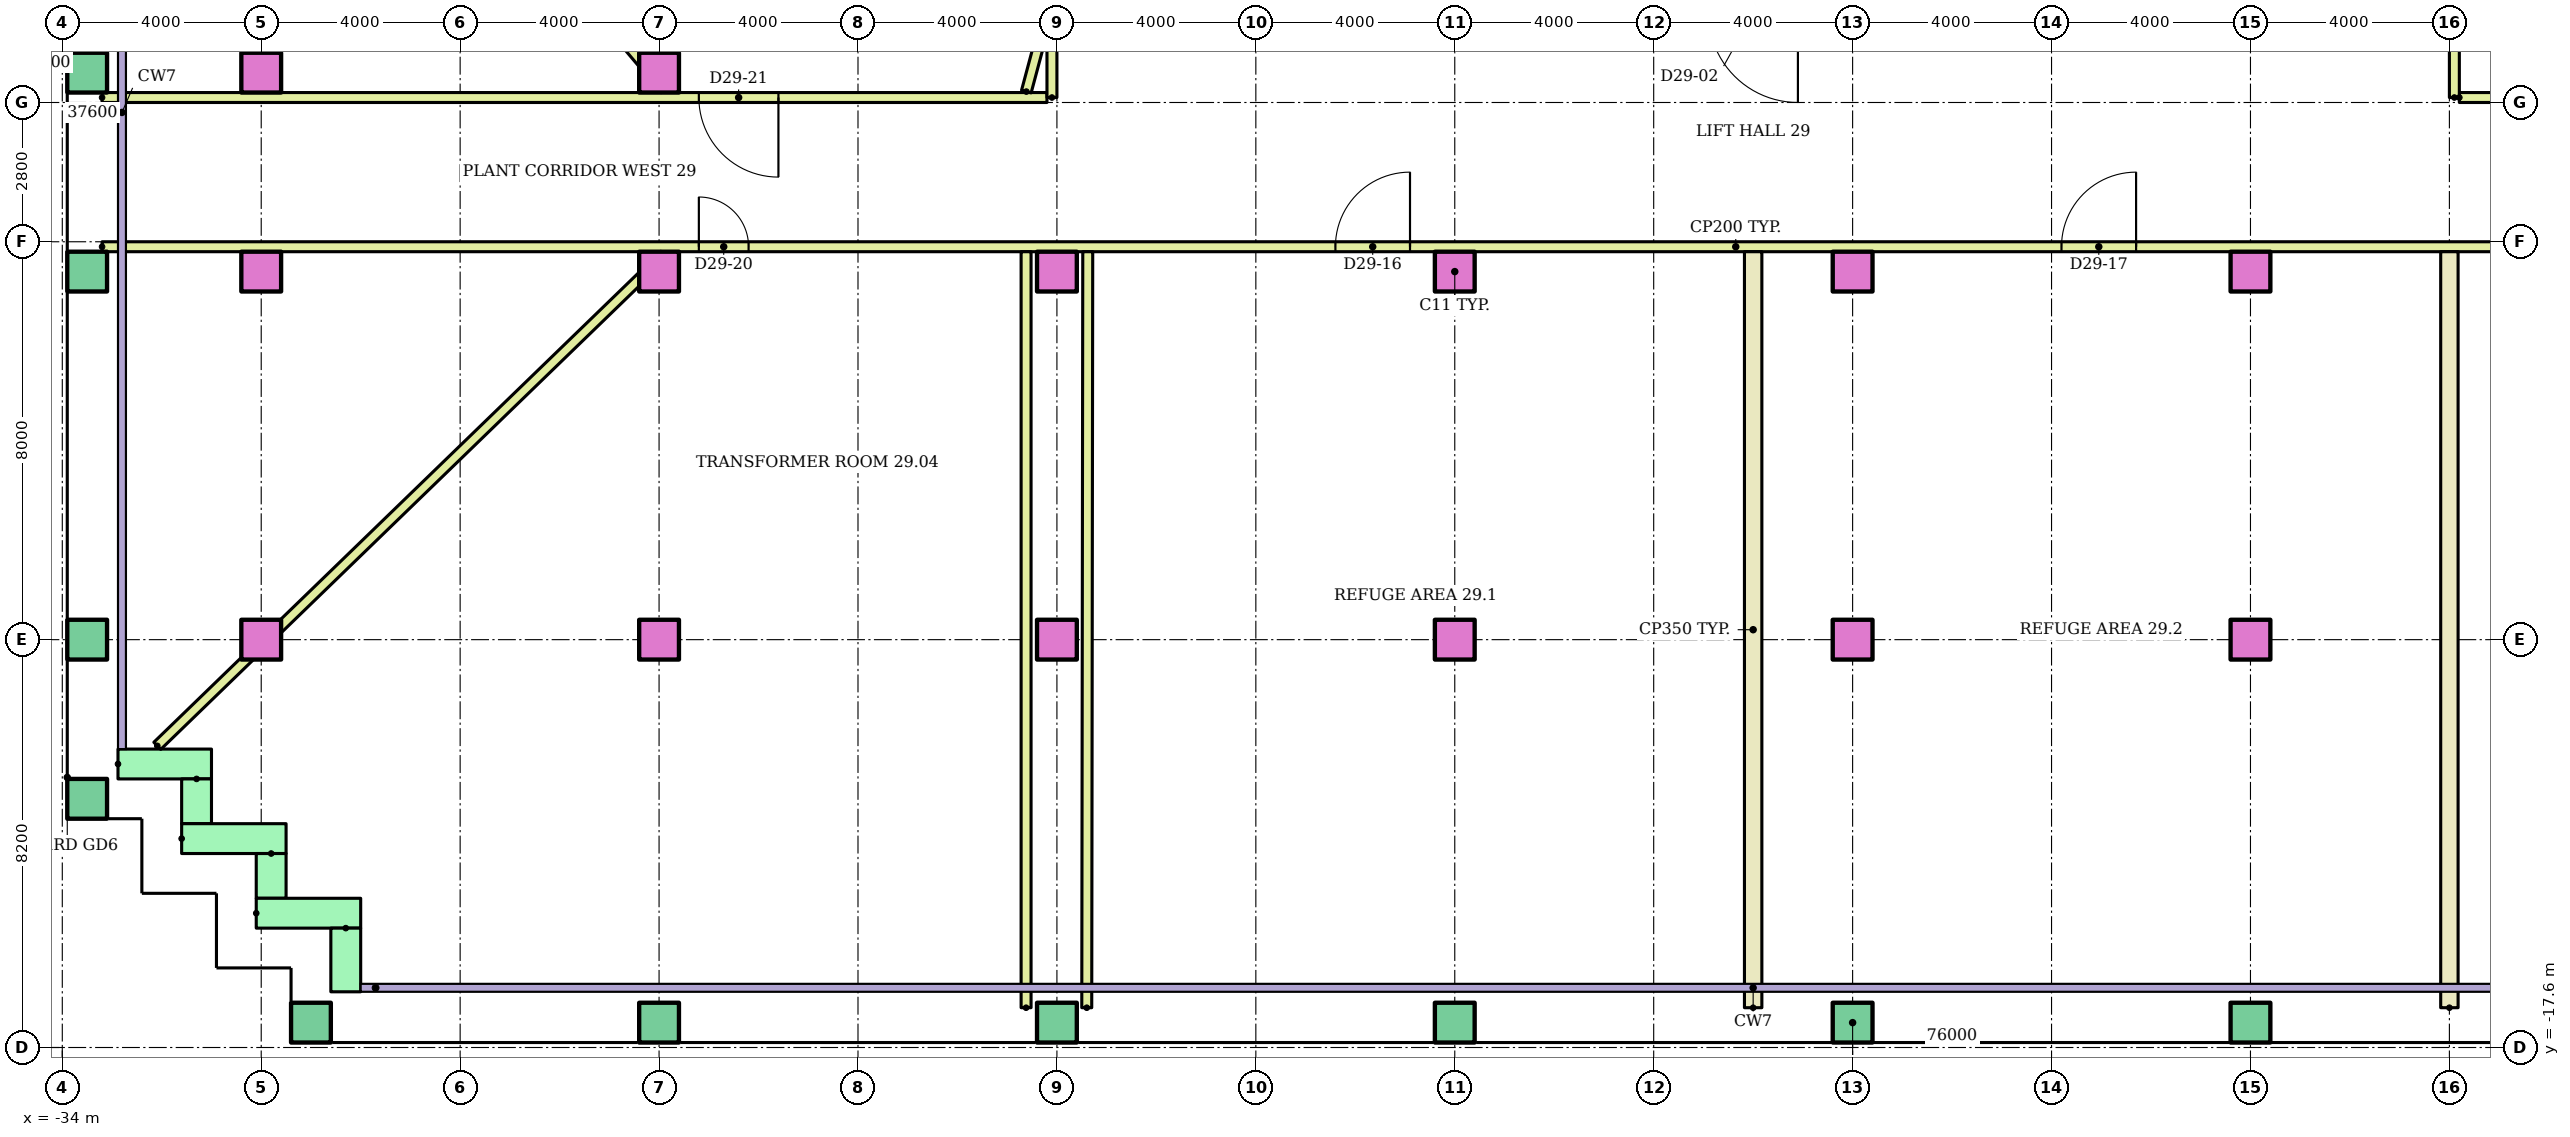
"""IFC4 building model, lengths in metres.
Left out: names, types, materials, properties, quantities, classifications, styles, units other than length and angle.
Written with IfcOpenShell. Run it as: python <this file> out.ifc"""

import sys

from ifc_helpers import new_model, si_unit, direction, frame, frame_2d, origin, origin_2d, place, context, subcontext, project, spatial, rectangle, hollow_rectangle, extrude, element, fill, save


model = new_model("IFC4")
c1 = context("Model", 3, precision=1e-05, world=origin(), true_north=direction((0.0, 1.0)))
c2 = subcontext(c1, "Body", "Model", "MODEL_VIEW")
j1 = project(units=[si_unit("LENGTHUNIT", "METRE"), si_unit("PLANEANGLEUNIT", "RADIAN")], contexts=[c1])
p1 = place(None, origin())
s1 = spatial("IfcSite", under=j1, at=p1, CompositionType="ELEMENT")
p2 = place(p1, origin())
s2 = spatial("IfcBuilding", under=s1, at=p2, CompositionType="ELEMENT")
p3 = place(p2, frame((0.0, 0.0, 115.9)))
s3 = spatial("IfcBuildingStorey", under=s2, at=p3, CompositionType="ELEMENT", Elevation=115.9)
for number, where in (
    (1, (-29.0, -17.1, 0.0)),
    (2, (-22.0, -17.1, 0.0)),
    (3, (-14.0, -17.1, 0.0)),
    (4, (-6.0, -17.1, 0.0)),
    (5, (2.0, -17.1, 0.0)),
    (6, (10.0, -17.1, 0.0)),
    (7, (-33.5, -12.6, 0.0)),
    (8, (-33.5, -9.4, 0.0)),
):
    element("IfcColumn", number, at=place(p3, frame(where)), inside=s3, PredefinedType="COLUMN", context=c2, shape_type="SweptSolid", body=[
        extrude(hollow_rectangle(XDim=0.8, YDim=0.8, WallThickness=0.04, at=origin_2d()), origin(), (0.0, 0.0, 1.0), 3.9),
    ])
for number, where in (
    (9, (-30.0, -9.4, 0.0)),
    (10, (-22.0, -9.4, 0.0)),
    (11, (-14.0, -9.4, 0.0)),
    (12, (-6.0, -9.4, 0.0)),
    (13, (2.0, -9.4, 0.0)),
    (14, (10.0, -9.4, 0.0)),
):
    element("IfcColumn", number, at=place(p3, frame(where)), inside=s3, PredefinedType="COLUMN", context=c2, shape_type="SweptSolid", body=[
        extrude(rectangle(XDim=0.8, YDim=0.8, at=origin_2d()), origin(), (0.0, 0.0, 1.0), 3.9),
    ])
p4 = place(p3, frame((-33.5, -2.0, 0.0)))
e15 = element("IfcColumn", 15, at=p4, inside=s3, PredefinedType="COLUMN", context=c2, shape_type="SweptSolid", body=[
    extrude(hollow_rectangle(XDim=0.8, YDim=0.8, WallThickness=0.04, at=origin_2d()), origin(), (0.0, 0.0, 1.0), 3.9),
])
for number, where in (
    (16, (-30.0, -2.0, 0.0)),
    (17, (-22.0, -2.0, 0.0)),
    (18, (-14.0, -2.0, 0.0)),
    (19, (-6.0, -2.0, 0.0)),
    (20, (2.0, -2.0, 0.0)),
    (21, (10.0, -2.0, 0.0)),
):
    element("IfcColumn", number, at=place(p3, frame(where)), inside=s3, PredefinedType="COLUMN", context=c2, shape_type="SweptSolid", body=[
        extrude(rectangle(XDim=0.8, YDim=0.8, at=origin_2d()), origin(), (0.0, 0.0, 1.0), 3.9),
    ])
p5 = place(p3, frame((-33.5, 2.0, 0.0)))
e22 = element("IfcColumn", 22, at=p5, inside=s3, PredefinedType="COLUMN", context=c2, shape_type="SweptSolid", body=[
    extrude(hollow_rectangle(XDim=0.8, YDim=0.8, WallThickness=0.04, at=origin_2d()), origin(), (0.0, 0.0, 1.0), 3.9),
])
for number, where in (
    (23, (-30.0, 2.0, 0.0)),
    (24, (-22.0, 2.0, 0.0)),
):
    element("IfcColumn", number, at=place(p3, frame(where)), inside=s3, PredefinedType="COLUMN", context=c2, shape_type="SweptSolid", body=[
        extrude(rectangle(XDim=0.8, YDim=0.8, at=origin_2d()), origin(), (0.0, 0.0, 1.0), 3.9),
    ])
p6 = place(p3, frame((-32.88, -11.9, 0.0)))
e25 = element("IfcWall", 25, at=p6, inside=s3, PredefinedType="STANDARD", context=c2, shape_type="SweptSolid", body=[
    extrude(rectangle(XDim=1.88, YDim=0.6, at=frame_2d((0.94, 0.0))), origin(), (0.0, 0.0, 1.0), 3.62),
])
p7 = place(p3, frame((-31.3, -12.2, 0.0), z_axis=(0.0, 0.0, 1.0), x_axis=(0.0, -1.0, 0.0)))
e26 = element("IfcWall", 26, at=p7, inside=s3, PredefinedType="STANDARD", context=c2, shape_type="SweptSolid", body=[
    extrude(rectangle(XDim=0.9, YDim=0.6, at=frame_2d((0.45, 0.0))), origin(), (0.0, 0.0, 1.0), 3.62),
])
p8 = place(p3, frame((-31.6, -13.4, 0.0)))
e27 = element("IfcWall", 27, at=p8, inside=s3, PredefinedType="STANDARD", context=c2, shape_type="SweptSolid", body=[
    extrude(rectangle(XDim=2.1, YDim=0.6, at=frame_2d((1.05, 0.0))), origin(), (0.0, 0.0, 1.0), 3.62),
])
p9 = place(p3, frame((-29.8, -13.7, 0.0), z_axis=(0.0, 0.0, 1.0), x_axis=(0.0, -1.0, 0.0)))
e28 = element("IfcWall", 28, at=p9, inside=s3, PredefinedType="STANDARD", context=c2, shape_type="SweptSolid", body=[
    extrude(rectangle(XDim=0.9, YDim=0.6, at=frame_2d((0.45, 0.0))), origin(), (0.0, 0.0, 1.0), 3.62),
])
p10 = place(p3, frame((-30.1, -14.9, 0.0)))
e29 = element("IfcWall", 29, at=p10, inside=s3, PredefinedType="STANDARD", context=c2, shape_type="SweptSolid", body=[
    extrude(rectangle(XDim=2.1, YDim=0.6, at=frame_2d((1.05, 0.0))), origin(), (0.0, 0.0, 1.0), 3.62),
])
p11 = place(p3, frame((-28.3, -15.2, 0.0), z_axis=(0.0, 0.0, 1.0), x_axis=(0.0, -1.0, 0.0)))
e30 = element("IfcWall", 30, at=p11, inside=s3, PredefinedType="STANDARD", context=c2, shape_type="SweptSolid", body=[
    extrude(rectangle(XDim=1.28, YDim=0.6, at=frame_2d((0.64, 0.0))), origin(), (0.0, 0.0, 1.0), 3.62),
])
p12 = place(p3, frame((-33.2, -1.5, 0.0)))
e31 = element("IfcWall", 31, at=p12, inside=s3, PredefinedType="PARTITIONING", context=c2, shape_type="SweptSolid", body=[
    extrude(rectangle(XDim=65.7, YDim=0.2, at=frame_2d((32.85, 0.0))), origin(), (0.0, 0.0, 1.0), 3.62),
])
p13 = place(p12, frame((24.8, 0.0, 0.0)))
e32 = element("IfcOpeningElement", 32, at=p13, cuts=e31, PredefinedType="OPENING", context=c2, shape_type="SweptSolid", body=[
    extrude(rectangle(XDim=1.5, YDim=2.1, at=frame_2d((0.75, 1.05))), frame((0.0, 0.11, 0.0), z_axis=(0.0, -1.0, 0.0), x_axis=(1.0, 0.0, 0.0)), (0.0, 0.0, 1.0), 0.22),
])
p14 = place(p12, frame((39.4, 0.0, 0.0)))
e33 = element("IfcOpeningElement", 33, at=p14, cuts=e31, PredefinedType="OPENING", context=c2, shape_type="SweptSolid", body=[
    extrude(rectangle(XDim=1.5, YDim=2.1, at=frame_2d((0.75, 1.05))), frame((0.0, 0.11, 0.0), z_axis=(0.0, -1.0, 0.0), x_axis=(1.0, 0.0, 0.0)), (0.0, 0.0, 1.0), 0.22),
])
p15 = place(p12, frame((55.2, 0.0, 0.0)))
e34 = element("IfcOpeningElement", 34, at=p15, cuts=e31, PredefinedType="OPENING", context=c2, shape_type="SweptSolid", body=[
    extrude(rectangle(XDim=1.6, YDim=2.4, at=frame_2d((0.8, 1.2))), frame((0.0, 0.11, 0.0), z_axis=(0.0, -1.0, 0.0), x_axis=(1.0, 0.0, 0.0)), (0.0, 0.0, 1.0), 0.22),
])
p16 = place(p12, frame((12.0, 0.0, 0.0)))
e35 = element("IfcOpeningElement", 35, at=p16, cuts=e31, PredefinedType="OPENING", context=c2, shape_type="SweptSolid", body=[
    extrude(rectangle(XDim=1.0, YDim=2.4, at=frame_2d((0.5, 1.2))), frame((0.0, 0.11, 0.0), z_axis=(0.0, -1.0, 0.0), x_axis=(1.0, 0.0, 0.0)), (0.0, 0.0, 1.0), 0.22),
])
p17 = place(p3, frame((-33.2, 1.5, 0.0)))
e36 = element("IfcWall", 36, at=p17, inside=s3, PredefinedType="PARTITIONING", context=c2, shape_type="SweptSolid", body=[
    extrude(rectangle(XDim=19.0, YDim=0.2, at=frame_2d((9.5, 0.0))), origin(), (0.0, 0.0, 1.0), 3.62),
])
p18 = place(p17, frame((12.0, 0.0, 0.0)))
e37 = element("IfcOpeningElement", 37, at=p18, cuts=e36, PredefinedType="OPENING", context=c2, shape_type="SweptSolid", body=[
    extrude(rectangle(XDim=1.6, YDim=2.4, at=frame_2d((0.8, 1.2))), frame((0.0, 0.11, 0.0), z_axis=(0.0, -1.0, 0.0), x_axis=(1.0, 0.0, 0.0)), (0.0, 0.0, 1.0), 0.22),
])
p19 = place(p3, frame((14.2, 1.5, 0.0)))
e38 = element("IfcWall", 38, at=p19, inside=s3, PredefinedType="PARTITIONING", context=c2, shape_type="SweptSolid", body=[
    extrude(rectangle(XDim=18.3, YDim=0.2, at=frame_2d((9.15, 0.0))), origin(), (0.0, 0.0, 1.0), 3.62),
])
p20 = place(p19, frame((8.0, 0.0, 0.0)))
e39 = element("IfcOpeningElement", 39, at=p20, cuts=e38, PredefinedType="OPENING", context=c2, shape_type="SweptSolid", body=[
    extrude(rectangle(XDim=1.6, YDim=2.4, at=frame_2d((0.8, 1.2))), frame((0.0, 0.11, 0.0), z_axis=(0.0, -1.0, 0.0), x_axis=(1.0, 0.0, 0.0)), (0.0, 0.0, 1.0), 0.22),
])
p21 = place(p3, frame((-14.1, 1.5, 0.0), z_axis=(0.0, 0.0, 1.0), x_axis=(0.0, 1.0, 0.0)))
e40 = element("IfcWall", 40, at=p21, inside=s3, PredefinedType="PARTITIONING", context=c2, shape_type="SweptSolid", body=[
    extrude(rectangle(XDim=1.31, YDim=0.2, at=frame_2d((0.655, 0.0))), origin(), (0.0, 0.0, 1.0), 3.62),
])
p22 = place(p3, frame((14.1, 1.5, 0.0), z_axis=(0.0, 0.0, 1.0), x_axis=(0.0, 1.0, 0.0)))
e41 = element("IfcWall", 41, at=p22, inside=s3, PredefinedType="PARTITIONING", context=c2, shape_type="SweptSolid", body=[
    extrude(rectangle(XDim=1.5, YDim=0.2, at=frame_2d((0.75, 0.0))), origin(), (0.0, 0.0, 1.0), 3.62),
])
p23 = place(p3, frame((-13.4, -16.8, 0.0), z_axis=(0.0, 0.0, 1.0), x_axis=(0.001317077513, 0.999999132653, 0.0)))
e42 = element("IfcWall", 42, at=p23, inside=s3, PredefinedType="PARTITIONING", context=c2, shape_type="SweptSolid", body=[
    extrude(rectangle(XDim=15.2, YDim=0.2, at=frame_2d((7.6, 0.0))), origin(), (0.0, 0.0, 1.0), 3.62),
])
p24 = place(p3, frame((-32.09, -11.535, 0.0), z_axis=(0.0, 0.0, 1.0), x_axis=(0.718386628717, 0.695644055304, 0.0)))
e43 = element("IfcWall", 43, at=p24, inside=s3, PredefinedType="PARTITIONING", context=c2, shape_type="SweptSolid", body=[
    extrude(rectangle(XDim=14.192, YDim=0.2, at=frame_2d((7.096, 0.0))), origin(), (0.0, 0.0, 1.0), 3.62),
])
p25 = place(p3, frame((-14.62, -16.8, 0.0), z_axis=(0.0, 0.0, 1.0), x_axis=(0.0, 1.0, 0.0)))
e44 = element("IfcWall", 44, at=p25, inside=s3, PredefinedType="PARTITIONING", context=c2, shape_type="SweptSolid", body=[
    extrude(rectangle(XDim=15.2, YDim=0.2, at=frame_2d((7.6, 0.0))), origin(), (0.0, 0.0, 1.0), 3.62),
])
for number, where, z_axis, x_axis in (
    (45, (0.0, -16.8, 0.0), (0.0, 0.0, 1.0), (0.0, 1.0, 0.0)),
    (46, (14.0, -16.8, 0.0), (0.0, 0.0, 1.0), (0.0, 1.0, 0.0)),
):
    element("IfcWall", number, at=place(p3, frame(where, z_axis=z_axis, x_axis=x_axis)), inside=s3, PredefinedType="PARTITIONING", context=c2, shape_type="SweptSolid", body=[
        extrude(rectangle(XDim=15.2, YDim=0.35, at=frame_2d((7.6, 0.0))), origin(), (0.0, 0.0, 1.0), 3.62),
    ])
p26 = place(p3, frame((-14.615, 1.619, 0.0), z_axis=(0.0, 0.0, 1.0), x_axis=(0.258429414785, 0.966030143201, 0.0)))
e47 = element("IfcWall", 47, at=p26, inside=s3, PredefinedType="PARTITIONING", context=c2, shape_type="SweptSolid", body=[
    extrude(rectangle(XDim=1.605, YDim=0.2, at=frame_2d((0.802, 0.0))), origin(), (0.0, 0.0, 1.0), 3.62),
])
p27 = place(p3, frame((-32.242, 13.943, 0.0), z_axis=(0.0, 0.0, 1.0), x_axis=(0.644761098281, -0.764384148281, 0.0)))
e48 = element("IfcWall", 48, at=p27, inside=s3, PredefinedType="PARTITIONING", context=c2, shape_type="SweptSolid", body=[
    extrude(rectangle(XDim=16.068, YDim=0.2, at=frame_2d((8.034, 0.0))), origin(), (0.0, 0.0, 1.0), 3.62),
])
p28 = place(p13, origin())
e49 = element("IfcDoor", 49, at=p28, inside=s3, OperationType="DOUBLE_DOOR_SINGLE_SWING", PredefinedType="DOOR", context=c2, shape_type="SweptSolid", body=[
    extrude(rectangle(XDim=1.5, YDim=2.1, at=frame_2d((0.75, 1.05))), frame((0.0, 0.025, 0.0), z_axis=(0.0, -1.0, 0.0), x_axis=(1.0, 0.0, 0.0)), (0.0, 0.0, 1.0), 0.05),
])
fill(e32, e49)
p29 = place(p14, origin())
e50 = element("IfcDoor", 50, at=p29, inside=s3, OperationType="DOUBLE_DOOR_SINGLE_SWING", PredefinedType="DOOR", context=c2, shape_type="SweptSolid", body=[
    extrude(rectangle(XDim=1.5, YDim=2.1, at=frame_2d((0.75, 1.05))), frame((0.0, 0.025, 0.0), z_axis=(0.0, -1.0, 0.0), x_axis=(1.0, 0.0, 0.0)), (0.0, 0.0, 1.0), 0.05),
])
fill(e33, e50)
p30 = place(p16, origin())
e51 = element("IfcDoor", 51, at=p30, inside=s3, OperationType="SINGLE_SWING_LEFT", PredefinedType="DOOR", context=c2, shape_type="SweptSolid", body=[
    extrude(rectangle(XDim=1.0, YDim=2.4, at=frame_2d((0.5, 1.2))), frame((0.0, 0.025, 0.0), z_axis=(0.0, -1.0, 0.0), x_axis=(1.0, 0.0, 0.0)), (0.0, 0.0, 1.0), 0.05),
])
fill(e35, e51)
p31 = place(p18, frame((1.6, 0.0, 0.0), z_axis=(0.0, 0.0, 1.0), x_axis=(-1.0, 0.0, 0.0)))
e52 = element("IfcDoor", 52, at=p31, inside=s3, OperationType="DOUBLE_DOOR_SINGLE_SWING", PredefinedType="DOOR", context=c2, shape_type="SweptSolid", body=[
    extrude(rectangle(XDim=1.6, YDim=2.4, at=frame_2d((0.8, 1.2))), frame((0.0, 0.025, 0.0), z_axis=(0.0, -1.0, 0.0), x_axis=(1.0, 0.0, 0.0)), (0.0, 0.0, 1.0), 0.05),
])
fill(e37, e52)
save(model, sys.argv[1])
